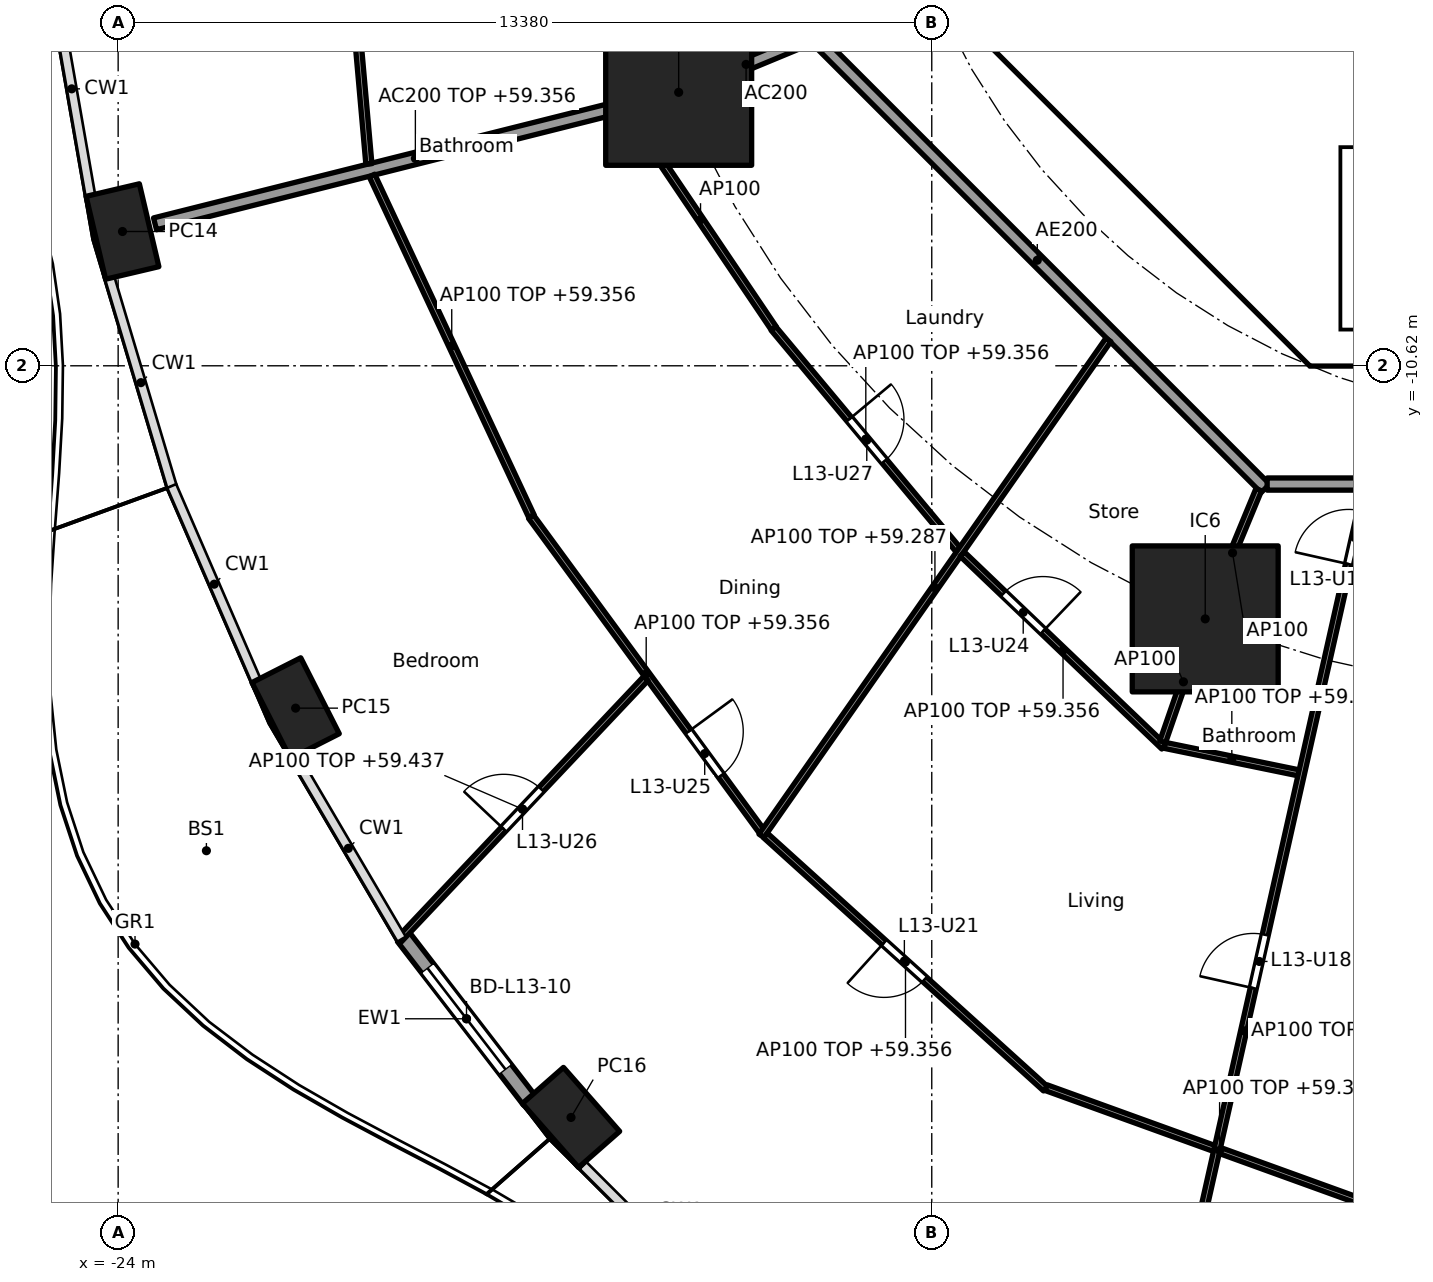
"""IFC4 building model, lengths in metres.
Left out: names, types, materials, properties, quantities, classifications, styles, units other than length and angle.
Written with IfcOpenShell. Run it as: python <this file> out.ifc"""

import sys

from ifc_helpers import new_model, si_unit, direction, frame, frame_2d, origin, origin_2d, place, context, subcontext, project, spatial, polyline, rectangle, hollow_rectangle, outline, extrude, element, fill, save


model = new_model("IFC4")
c1 = context("Model", 3, precision=1e-05, world=origin(), true_north=direction((0.0, 1.0)))
c2 = subcontext(c1, "Body", "Model", "MODEL_VIEW")
j1 = project(units=[si_unit("LENGTHUNIT", "METRE"), si_unit("PLANEANGLEUNIT", "RADIAN")], contexts=[c1])
p1 = place(None, origin())
s1 = spatial("IfcSite", under=j1, at=p1, CompositionType="ELEMENT")
p2 = place(p1, origin())
s2 = spatial("IfcBuilding", under=s1, at=p2, CompositionType="ELEMENT")
p3 = place(p2, frame((0.0, 0.0, 56.6)))
s3 = spatial("IfcBuildingStorey", under=s2, at=p3, CompositionType="ELEMENT", Elevation=56.6)
for number, where, z_axis, x_axis in (
    (1, (-23.929, -8.412, 0.0), (0.0, 0.0, 1.0), (0.229, -0.973, 0.0)),
    (2, (-21.082, -16.25, 0.0), (0.0, 0.0, 1.0), (0.452, -0.892, 0.0)),
    (3, (-16.552, -22.981, 0.0), (0.0, 0.0, 1.0), (0.66, -0.751, 0.0)),
):
    element("IfcColumn", number, at=place(p3, frame(where, z_axis=z_axis, x_axis=x_axis)), inside=s3, PredefinedType="COLUMN", context=c2, shape_type="SweptSolid", body=[
        extrude(hollow_rectangle(XDim=1.4, YDim=0.9, WallThickness=0.05, at=origin_2d()), origin(), (0.0, 0.0, 1.0), 3.7),
    ])
for number, where, z_axis, x_axis in (
    (4, (-14.782, -6.123, 0.0), (0.0, 0.0, 1.0), (1.0, 0.0, 0.0)),
    (5, (-6.123, -14.782, 0.0), (0.0, 0.0, 1.0), (1.0, 0.0, 0.0)),
):
    element("IfcColumn", number, at=place(p3, frame(where, z_axis=z_axis, x_axis=x_axis)), inside=s3, PredefinedType="COLUMN", context=c2, shape_type="SweptSolid", body=[
        extrude(rectangle(XDim=2.4, YDim=2.4, at=origin_2d()), origin(), (0.0, 0.0, 1.0), 3.7),
    ])
p4 = place(p3, frame((-17.234, -22.704, 0.0), z_axis=(0.0, 0.0, 1.0), x_axis=(-0.610457147657, 0.792049285635, 0.0)))
e6 = element("IfcWall", 6, at=p4, inside=s3, PredefinedType="SOLIDWALL", context=c2, shape_type="SweptSolid", body=[
    extrude(rectangle(XDim=3.397, YDim=0.25, at=frame_2d((1.699, 0.0))), origin(), (0.0, 0.0, 1.0), 3.44),
])
p5 = place(p4, frame((0.649, 0.0, 0.0)))
e7 = element("IfcOpeningElement", 7, at=p5, cuts=e6, PredefinedType="OPENING", context=c2, shape_type="SweptSolid", body=[
    extrude(rectangle(XDim=2.1, YDim=2.4, at=frame_2d((1.05, 1.2))), frame((0.0, 0.135, 0.0), z_axis=(0.0, -1.0, 0.0), x_axis=(1.0, 0.0, 0.0)), (0.0, 0.0, 1.0), 0.27),
])
p6 = place(p3, frame((-9.988, -4.613, 0.0), z_axis=(0.0, 0.0, 1.0), x_axis=(0.707106781187, -0.707106781187, 0.0)))
e8 = element("IfcWall", 8, at=p6, inside=s3, PredefinedType="SHEAR", context=c2, shape_type="SweptSolid", body=[
    extrude(rectangle(XDim=7.602, YDim=0.6, at=frame_2d((3.801, 0.0))), origin(), (0.0, 0.0, 1.0), 3.44),
])
p7 = place(p6, frame((6.151, 0.0, 0.0)))
e9 = element("IfcOpeningElement", 9, at=p7, cuts=e8, PredefinedType="OPENING", context=c2, shape_type="SweptSolid", body=[
    extrude(rectangle(XDim=1.1, YDim=2.1, at=frame_2d((0.55, 1.05))), frame((0.0, 0.31, 0.0), z_axis=(0.0, -1.0, 0.0), x_axis=(1.0, 0.0, 0.0)), (0.0, 0.0, 1.0), 0.62),
])
p8 = place(p3, frame((-7.4, -6.627, 0.0), z_axis=(0.0, 0.0, 1.0), x_axis=(0.0, 1.0, 0.0)))
e10 = element("IfcWall", 10, at=p8, inside=s3, PredefinedType="PARTITIONING", context=c2, shape_type="SweptSolid", body=[
    extrude(rectangle(XDim=2.527, YDim=0.15, at=frame_2d((1.263, 0.0))), origin(), (0.0, 0.0, 1.0), 3.44),
])
p9 = place(p8, frame((0.776, 0.0, 0.0)))
e11 = element("IfcOpeningElement", 11, at=p9, cuts=e10, PredefinedType="OPENING", context=c2, shape_type="SweptSolid", body=[
    extrude(rectangle(XDim=0.9, YDim=2.1, at=frame_2d((0.45, 1.05))), frame((0.0, 0.085, 0.0), z_axis=(0.0, -1.0, 0.0), x_axis=(1.0, 0.0, 0.0)), (0.0, 0.0, 1.0), 0.17),
])
p10 = place(p3, frame((-4.0, -6.5, 0.0), z_axis=(0.0, 0.0, 1.0), x_axis=(0.0, 1.0, 0.0)))
e12 = element("IfcWall", 12, at=p10, inside=s3, PredefinedType="SOLIDWALL", context=c2, shape_type="SweptSolid", body=[
    extrude(rectangle(XDim=2.2, YDim=0.2, at=frame_2d((1.1, 0.0))), origin(), (0.0, 0.0, 1.0), 3.44),
])
p11 = place(p10, frame((0.65, 0.0, 0.0)))
e13 = element("IfcOpeningElement", 13, at=p11, cuts=e12, PredefinedType="OPENING", context=c2, shape_type="SweptSolid", body=[
    extrude(rectangle(XDim=0.9, YDim=2.1, at=frame_2d((0.45, 1.05))), frame((0.0, 0.11, 0.0), z_axis=(0.0, -1.0, 0.0), x_axis=(1.0, 0.0, 0.0)), (0.0, 0.0, 1.0), 0.22),
])
p12 = place(p3, origin())
e14 = element("IfcWall", 14, at=p12, inside=s3, PredefinedType="SHEAR", context=c2, shape_type="SweptSolid", body=[
    extrude(outline(polyline([(-4.152, -10.025), (4.152, -10.025), (4.401, -9.776), (4.825, -10.2), (4.401, -10.625), (-4.401, -10.625), (-4.825, -10.2), (-4.401, -9.776), (-4.152, -10.025)])), origin(), (0.0, 0.0, 1.0), 3.44),
])
p13 = place(p3, origin())
e15 = element("IfcWall", 15, at=p13, inside=s3, PredefinedType="SOLIDWALL", context=c2, shape_type="SweptSolid", body=[
    extrude(outline(polyline([(-3.9, -10.025), (-4.1, -10.025), (-4.1, -7.025), (-3.9, -7.025), (-3.9, -10.025)])), origin(), (0.0, 0.0, 1.0), 3.44),
])
p14 = place(p3, origin())
e16 = element("IfcWall", 16, at=p14, inside=s3, PredefinedType="SOLIDWALL", context=c2, shape_type="SweptSolid", body=[
    extrude(outline(polyline([(4.1, -7.025), (-4.1, -7.025), (-4.1, -6.5), (4.1, -6.5), (4.1, -7.025)])), origin(), (0.0, 0.0, 1.0), 3.44),
])
p15 = place(p3, frame((-12.657, -5.243, 0.0), z_axis=(0.0, 0.0, 1.0), x_axis=(-0.923885664896, -0.382668627144, 0.0)))
e17 = element("IfcWall", 17, at=p15, inside=s3, PredefinedType="PARTITIONING", context=c2, shape_type="SweptSolid", body=[
    extrude(rectangle(XDim=2.2, YDim=0.2, at=frame_2d((1.1, 0.0))), origin(), (0.0, 0.0, 1.0), 3.44),
])
p16 = place(p3, frame((-14.831, -6.135, 0.0), z_axis=(0.0, 0.0, 1.0), x_axis=(-0.969884949569, -0.243563512454, 0.0)))
e18 = element("IfcWall", 18, at=p16, inside=s3, PredefinedType="PARTITIONING", context=c2, shape_type="SweptSolid", body=[
    extrude(rectangle(XDim=8.829, YDim=0.2, at=frame_2d((4.415, 0.0))), origin(), (0.0, 0.0, 1.0), 2.756),
])
p17 = place(p3, frame((-12.635, -5.134, 0.0), z_axis=(0.0, 0.0, 1.0), x_axis=(0.707106781187, -0.707106781187, 0.0)))
e19 = element("IfcWall", 19, at=p17, inside=s3, PredefinedType="PARTITIONING", context=c2, shape_type="SweptSolid", body=[
    extrude(rectangle(XDim=10.609, YDim=0.2, at=frame_2d((5.305, 0.0))), origin(), (0.0, 0.0, 1.0), 3.44),
])
p18 = place(p3, frame((-5.104, -12.565, 0.0), z_axis=(0.0, 0.0, 1.0), x_axis=(1.0, 0.0, 0.0)))
e20 = element("IfcWall", 20, at=p18, inside=s3, PredefinedType="PARTITIONING", context=c2, shape_type="SweptSolid", body=[
    extrude(rectangle(XDim=10.409, YDim=0.2, at=frame_2d((5.205, 0.0))), origin(), (0.0, 0.0, 1.0), 3.44),
])
p19 = place(p18, frame((2.87, 0.0, 0.0)))
e21 = element("IfcOpeningElement", 21, at=p19, cuts=e20, PredefinedType="OPENING", context=c2, shape_type="SweptSolid", body=[
    extrude(rectangle(XDim=1.0, YDim=2.1, at=frame_2d((0.5, 1.05))), frame((0.0, 0.11, 0.0), z_axis=(0.0, -1.0, 0.0), x_axis=(1.0, 0.0, 0.0)), (0.0, 0.0, 1.0), 0.22),
])
p20 = place(p3, frame((-20.518, -0.05, 0.0), z_axis=(0.0, 0.0, 1.0), x_axis=(0.088143415068, -0.996107794558, 0.0)))
e22 = element("IfcWall", 22, at=p20, inside=s3, PredefinedType="PARTITIONING", context=c2, shape_type="SweptSolid", body=[
    extrude(rectangle(XDim=7.279, YDim=0.1, at=frame_2d((3.64, 0.0))), origin(), (0.0, 0.0, 1.0), 2.756),
])
p21 = place(p3, frame((-15.854, -3.225, 0.0), z_axis=(0.0, 0.0, 1.0), x_axis=(0.054644199943, -0.998505889523, 0.0)))
e23 = element("IfcWall", 23, at=p21, inside=s3, PredefinedType="PARTITIONING", context=c2, shape_type="SweptSolid", body=[
    extrude(rectangle(XDim=3.029, YDim=0.1, at=frame_2d((1.515, 0.0))), origin(), (0.0, 0.0, 1.0), 2.756),
])
p22 = place(p3, frame((-15.627, -6.432, 0.0), z_axis=(0.0, 0.0, 1.0), x_axis=(0.559112679527, -0.829091678641, 0.0)))
e24 = element("IfcWall", 24, at=p22, inside=s3, PredefinedType="PARTITIONING", context=c2, shape_type="SweptSolid", body=[
    extrude(rectangle(XDim=4.308, YDim=0.1, at=frame_2d((2.154, 0.0))), origin(), (0.0, 0.0, 1.0), 3.44),
])
p23 = place(p3, frame((-19.826, -7.491, 0.0), z_axis=(0.0, 0.0, 1.0), x_axis=(0.423926333401, -0.905696673202, 0.0)))
e25 = element("IfcWall", 25, at=p23, inside=s3, PredefinedType="PARTITIONING", context=c2, shape_type="SweptSolid", body=[
    extrude(rectangle(XDim=6.188, YDim=0.1, at=frame_2d((3.094, 0.0))), origin(), (0.0, 0.0, 1.0), 2.756),
])
p24 = place(p3, frame((-13.222, -10.007, 0.0), z_axis=(0.0, 0.0, 1.0), x_axis=(0.640807748916, -0.767701393075, 0.0)))
e26 = element("IfcWall", 26, at=p24, inside=s3, PredefinedType="PARTITIONING", context=c2, shape_type="SweptSolid", body=[
    extrude(rectangle(XDim=4.737, YDim=0.1, at=frame_2d((2.368, 0.0))), origin(), (0.0, 0.0, 1.0), 2.756),
])
p25 = place(p24, frame((1.943, 0.0, 0.0)))
e27 = element("IfcOpeningElement", 27, at=p25, cuts=e26, PredefinedType="OPENING", context=c2, shape_type="SweptSolid", body=[
    extrude(rectangle(XDim=0.9, YDim=2.1, at=frame_2d((0.45, 1.05))), frame((0.0, 0.06, 0.0), z_axis=(0.0, -1.0, 0.0), x_axis=(1.0, 0.0, 0.0)), (0.0, 0.0, 1.0), 0.12),
])
p26 = place(p3, frame((-17.211, -13.1, 0.0), z_axis=(0.0, 0.0, 1.0), x_axis=(0.591206785834, -0.806520016109, 0.0)))
e28 = element("IfcWall", 28, at=p26, inside=s3, PredefinedType="PARTITIONING", context=c2, shape_type="SweptSolid", body=[
    extrude(rectangle(XDim=6.41, YDim=0.1, at=frame_2d((3.205, 0.0))), origin(), (0.0, 0.0, 1.0), 2.756),
])
p27 = place(p26, frame((4.383, 0.0, 0.0)))
e29 = element("IfcOpeningElement", 29, at=p27, cuts=e28, PredefinedType="OPENING", context=c2, shape_type="SweptSolid", body=[
    extrude(rectangle(XDim=0.9, YDim=2.1, at=frame_2d((0.45, 1.05))), frame((0.0, 0.06, 0.0), z_axis=(0.0, -1.0, 0.0), x_axis=(1.0, 0.0, 0.0)), (0.0, 0.0, 1.0), 0.12),
])
p28 = place(p3, frame((-15.321, -15.761, 0.0), z_axis=(0.0, 0.0, 1.0), x_axis=(-0.686519245775, -0.727111631856, 0.0)))
e30 = element("IfcWall", 30, at=p28, inside=s3, PredefinedType="PARTITIONING", context=c2, shape_type="SweptSolid", body=[
    extrude(rectangle(XDim=5.912, YDim=0.1, at=frame_2d((2.956, 0.0))), origin(), (0.0, 0.0, 1.0), 2.837),
])
p29 = place(p28, frame((2.506, 0.0, 0.0)))
e31 = element("IfcOpeningElement", 31, at=p29, cuts=e30, PredefinedType="OPENING", context=c2, shape_type="SweptSolid", body=[
    extrude(rectangle(XDim=0.9, YDim=2.1, at=frame_2d((0.45, 1.05))), frame((0.0, 0.06, 0.0), z_axis=(0.0, -1.0, 0.0), x_axis=(1.0, 0.0, 0.0)), (0.0, 0.0, 1.0), 0.12),
])
p30 = place(p3, frame((-7.715, -10.193, 0.0), z_axis=(0.0, 0.0, 1.0), x_axis=(-0.573126502256, -0.819466907454, 0.0)))
e32 = element("IfcWall", 32, at=p30, inside=s3, PredefinedType="PARTITIONING", context=c2, shape_type="SweptSolid", body=[
    extrude(rectangle(XDim=9.954, YDim=0.1, at=frame_2d((4.977, 0.0))), origin(), (0.0, 0.0, 1.0), 2.687),
])
p31 = place(p3, frame((-10.119, -13.716, 0.0), z_axis=(0.0, 0.0, 1.0), x_axis=(0.722763212502, -0.69109575216, 0.0)))
e33 = element("IfcWall", 33, at=p31, inside=s3, PredefinedType="PARTITIONING", context=c2, shape_type="SweptSolid", body=[
    extrude(rectangle(XDim=4.587, YDim=0.1, at=frame_2d((2.293, 0.0))), origin(), (0.0, 0.0, 1.0), 2.756),
])
p32 = place(p31, frame((0.938, 0.0, 0.0)))
e34 = element("IfcOpeningElement", 34, at=p32, cuts=e33, PredefinedType="OPENING", context=c2, shape_type="SweptSolid", body=[
    extrude(rectangle(XDim=0.9, YDim=2.1, at=frame_2d((0.45, 1.05))), frame((0.0, 0.06, 0.0), z_axis=(0.0, -1.0, 0.0), x_axis=(1.0, 0.0, 0.0)), (0.0, 0.0, 1.0), 0.12),
])
p33 = place(p3, frame((-13.355, -18.343, 0.0), z_axis=(0.0, 0.0, 1.0), x_axis=(0.741720189244, -0.670709445936, 0.0)))
e35 = element("IfcWall", 35, at=p33, inside=s3, PredefinedType="PARTITIONING", context=c2, shape_type="SweptSolid", body=[
    extrude(rectangle(XDim=6.209, YDim=0.1, at=frame_2d((3.104, 0.0))), origin(), (0.0, 0.0, 1.0), 2.756),
])
p34 = place(p33, frame((2.63, 0.0, 0.0)))
e36 = element("IfcOpeningElement", 36, at=p34, cuts=e35, PredefinedType="OPENING", context=c2, shape_type="SweptSolid", body=[
    extrude(rectangle(XDim=0.9, YDim=2.1, at=frame_2d((0.45, 1.05))), frame((0.0, 0.06, 0.0), z_axis=(0.0, -1.0, 0.0), x_axis=(1.0, 0.0, 0.0)), (0.0, 0.0, 1.0), 0.12),
])
p35 = place(p3, frame((-5.243, -12.657, 0.0), z_axis=(0.0, 0.0, 1.0), x_axis=(-0.382719158442, -0.923864733477, 0.0)))
e37 = element("IfcWall", 37, at=p35, inside=s3, PredefinedType="PARTITIONING", context=c2, shape_type="SweptSolid", body=[
    extrude(rectangle(XDim=2.25, YDim=0.1, at=frame_2d((1.125, 0.0))), origin(), (0.0, 0.0, 1.0), 3.44),
])
p36 = place(p3, frame((-6.139, -14.83, 0.0), z_axis=(0.0, 0.0, 1.0), x_axis=(-0.327246993321, -0.944938836837, 0.0)))
e38 = element("IfcWall", 38, at=p36, inside=s3, PredefinedType="PARTITIONING", context=c2, shape_type="SweptSolid", body=[
    extrude(rectangle(XDim=2.09, YDim=0.1, at=frame_2d((1.045, 0.0))), origin(), (0.0, 0.0, 1.0), 3.44),
])
p37 = place(p3, frame((-6.791, -16.862, 0.0), z_axis=(0.0, 0.0, 1.0), x_axis=(0.979581941859, -0.201045316246, 0.0)))
e39 = element("IfcWall", 39, at=p37, inside=s3, PredefinedType="PARTITIONING", context=c2, shape_type="SweptSolid", body=[
    extrude(rectangle(XDim=2.256, YDim=0.1, at=frame_2d((1.128, 0.0))), origin(), (0.0, 0.0, 1.0), 2.756),
])
p38 = place(p3, frame((-8.739, -22.491, 0.0), z_axis=(0.0, 0.0, 1.0), x_axis=(0.940401691072, -0.340065669288, 0.0)))
e40 = element("IfcWall", 40, at=p38, inside=s3, PredefinedType="PARTITIONING", context=c2, shape_type="SweptSolid", body=[
    extrude(rectangle(XDim=6.067, YDim=0.1, at=frame_2d((3.034, 0.0))), origin(), (0.0, 0.0, 1.0), 2.756),
])
p39 = place(p3, frame((-3.492, -12.662, 0.0), z_axis=(0.0, 0.0, 1.0), x_axis=(-0.219268088006, -0.975664648115, 0.0)))
e41 = element("IfcWall", 41, at=p39, inside=s3, PredefinedType="PARTITIONING", context=c2, shape_type="SweptSolid", body=[
    extrude(rectangle(XDim=18.23, YDim=0.1, at=frame_2d((9.115, 0.0))), origin(), (0.0, 0.0, 1.0), 2.687),
])
p40 = place(p39, frame((0.35, 0.0, 0.0)))
e42 = element("IfcOpeningElement", 42, at=p40, cuts=e41, PredefinedType="OPENING", context=c2, shape_type="SweptSolid", body=[
    extrude(rectangle(XDim=0.9, YDim=2.1, at=frame_2d((0.45, 1.05))), frame((0.0, 0.06, 0.0), z_axis=(0.0, -1.0, 0.0), x_axis=(1.0, 0.0, 0.0)), (0.0, 0.0, 1.0), 0.12),
])
p41 = place(p39, frame((7.497, 0.0, 0.0)))
e43 = element("IfcOpeningElement", 43, at=p41, cuts=e41, PredefinedType="OPENING", context=c2, shape_type="SweptSolid", body=[
    extrude(rectangle(XDim=0.9, YDim=2.1, at=frame_2d((0.45, 1.05))), frame((0.0, 0.06, 0.0), z_axis=(0.0, -1.0, 0.0), x_axis=(1.0, 0.0, 0.0)), (0.0, 0.0, 1.0), 0.12),
])
p42 = place(p39, frame((14.223, 0.0, 0.0)))
e44 = element("IfcOpeningElement", 44, at=p42, cuts=e41, PredefinedType="OPENING", context=c2, shape_type="SweptSolid", body=[
    extrude(rectangle(XDim=0.9, YDim=2.1, at=frame_2d((0.45, 1.05))), frame((0.0, 0.06, 0.0), z_axis=(0.0, -1.0, 0.0), x_axis=(1.0, 0.0, 0.0)), (0.0, 0.0, 1.0), 0.12),
])
p43 = place(p5, origin())
e45 = element("IfcDoor", 45, at=p43, inside=s3, OperationType="SLIDING_TO_LEFT", PredefinedType="DOOR", context=c2, shape_type="SweptSolid", body=[
    extrude(rectangle(XDim=2.1, YDim=2.4, at=frame_2d((1.05, 1.2))), frame((0.0, 0.025, 0.0), z_axis=(0.0, -1.0, 0.0), x_axis=(1.0, 0.0, 0.0)), (0.0, 0.0, 1.0), 0.05),
])
fill(e7, e45)
p44 = place(p9, origin())
e46 = element("IfcDoor", 46, at=p44, inside=s3, OperationType="SINGLE_SWING_RIGHT", PredefinedType="DOOR", context=c2, shape_type="SweptSolid", body=[
    extrude(rectangle(XDim=0.9, YDim=2.1, at=frame_2d((0.45, 1.05))), frame((0.0, 0.025, 0.0), z_axis=(0.0, -1.0, 0.0), x_axis=(1.0, 0.0, 0.0)), (0.0, 0.0, 1.0), 0.05),
])
fill(e11, e46)
p45 = place(p11, frame((0.9, 0.0, 0.0), x_axis=(-1.0, 0.0, 0.0)))
e47 = element("IfcDoor", 47, at=p45, inside=s3, OperationType="SINGLE_SWING_RIGHT", PredefinedType="DOOR", context=c2, shape_type="SweptSolid", body=[
    extrude(rectangle(XDim=0.9, YDim=2.1, at=frame_2d((0.45, 1.05))), frame((0.0, 0.025, 0.0), z_axis=(0.0, -1.0, 0.0), x_axis=(1.0, 0.0, 0.0)), (0.0, 0.0, 1.0), 0.05),
])
fill(e13, e47)
p46 = place(p7, origin())
e48 = element("IfcDoor", 48, at=p46, inside=s3, OperationType="SINGLE_SWING_LEFT", PredefinedType="DOOR", context=c2, shape_type="SweptSolid", body=[
    extrude(rectangle(XDim=1.1, YDim=2.1, at=frame_2d((0.55, 1.05))), frame((0.0, 0.025, 0.0), z_axis=(0.0, -1.0, 0.0), x_axis=(1.0, 0.0, 0.0)), (0.0, 0.0, 1.0), 0.05),
])
fill(e9, e48)
p47 = place(p40, frame((0.9, 0.0, 0.0), x_axis=(-1.0, 0.0, 0.0)))
e49 = element("IfcDoor", 49, at=p47, inside=s3, OperationType="SINGLE_SWING_LEFT", PredefinedType="DOOR", context=c2, shape_type="SweptSolid", body=[
    extrude(rectangle(XDim=0.9, YDim=2.1, at=frame_2d((0.45, 1.05))), frame((0.0, 0.025, 0.0), z_axis=(0.0, -1.0, 0.0), x_axis=(1.0, 0.0, 0.0)), (0.0, 0.0, 1.0), 0.05),
])
fill(e42, e49)
p48 = place(p41, frame((0.9, 0.0, 0.0), x_axis=(-1.0, 0.0, 0.0)))
e50 = element("IfcDoor", 50, at=p48, inside=s3, OperationType="SINGLE_SWING_LEFT", PredefinedType="DOOR", context=c2, shape_type="SweptSolid", body=[
    extrude(rectangle(XDim=0.9, YDim=2.1, at=frame_2d((0.45, 1.05))), frame((0.0, 0.025, 0.0), z_axis=(0.0, -1.0, 0.0), x_axis=(1.0, 0.0, 0.0)), (0.0, 0.0, 1.0), 0.05),
])
fill(e43, e50)
p49 = place(p34, frame((0.9, 0.0, 0.0), x_axis=(-1.0, 0.0, 0.0)))
e51 = element("IfcDoor", 51, at=p49, inside=s3, OperationType="SINGLE_SWING_RIGHT", PredefinedType="DOOR", context=c2, shape_type="SweptSolid", body=[
    extrude(rectangle(XDim=0.9, YDim=2.1, at=frame_2d((0.45, 1.05))), frame((0.0, 0.025, 0.0), z_axis=(0.0, -1.0, 0.0), x_axis=(1.0, 0.0, 0.0)), (0.0, 0.0, 1.0), 0.05),
])
fill(e36, e51)
p50 = place(p32, origin())
e52 = element("IfcDoor", 52, at=p50, inside=s3, OperationType="SINGLE_SWING_RIGHT", PredefinedType="DOOR", context=c2, shape_type="SweptSolid", body=[
    extrude(rectangle(XDim=0.9, YDim=2.1, at=frame_2d((0.45, 1.05))), frame((0.0, 0.025, 0.0), z_axis=(0.0, -1.0, 0.0), x_axis=(1.0, 0.0, 0.0)), (0.0, 0.0, 1.0), 0.05),
])
fill(e34, e52)
p51 = place(p27, origin())
e53 = element("IfcDoor", 53, at=p51, inside=s3, OperationType="SINGLE_SWING_LEFT", PredefinedType="DOOR", context=c2, shape_type="SweptSolid", body=[
    extrude(rectangle(XDim=0.9, YDim=2.1, at=frame_2d((0.45, 1.05))), frame((0.0, 0.025, 0.0), z_axis=(0.0, -1.0, 0.0), x_axis=(1.0, 0.0, 0.0)), (0.0, 0.0, 1.0), 0.05),
])
fill(e29, e53)
p52 = place(p29, frame((0.9, 0.0, 0.0), x_axis=(-1.0, 0.0, 0.0)))
e54 = element("IfcDoor", 54, at=p52, inside=s3, OperationType="SINGLE_SWING_LEFT", PredefinedType="DOOR", context=c2, shape_type="SweptSolid", body=[
    extrude(rectangle(XDim=0.9, YDim=2.1, at=frame_2d((0.45, 1.05))), frame((0.0, 0.025, 0.0), z_axis=(0.0, -1.0, 0.0), x_axis=(1.0, 0.0, 0.0)), (0.0, 0.0, 1.0), 0.05),
])
fill(e31, e54)
p53 = place(p25, origin())
e55 = element("IfcDoor", 55, at=p53, inside=s3, OperationType="SINGLE_SWING_LEFT", PredefinedType="DOOR", context=c2, shape_type="SweptSolid", body=[
    extrude(rectangle(XDim=0.9, YDim=2.1, at=frame_2d((0.45, 1.05))), frame((0.0, 0.025, 0.0), z_axis=(0.0, -1.0, 0.0), x_axis=(1.0, 0.0, 0.0)), (0.0, 0.0, 1.0), 0.05),
])
fill(e27, e55)
save(model, sys.argv[1])
